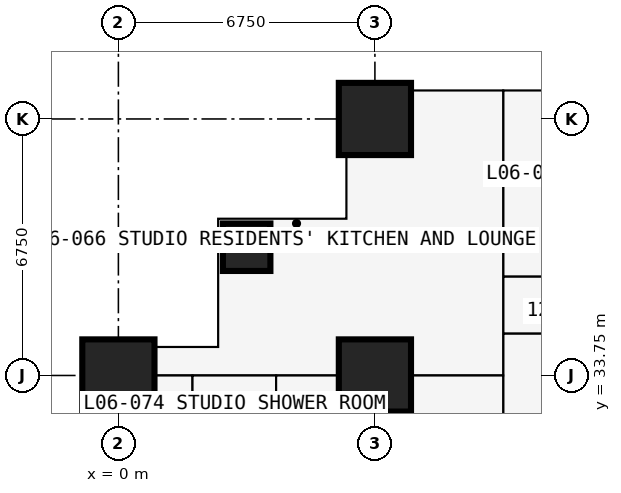
"""IFC4 building model, lengths in metres.
Left out: names, types, materials, properties, quantities, classifications, styles, units other than length and angle.
Written with IfcOpenShell. Run it as: python <this file> out.ifc"""

import sys

from ifc_helpers import new_model, si_unit, direction, frame, frame_2d, origin, origin_2d, place, context, subcontext, project, spatial, rectangle, extrude, element, fill, save


model = new_model("IFC4")
c1 = context("Model", 3, precision=1e-05, world=origin(), true_north=direction((0.0, 1.0)))
c2 = subcontext(c1, "Body", "Model", "MODEL_VIEW")
j1 = project(units=[si_unit("LENGTHUNIT", "METRE"), si_unit("PLANEANGLEUNIT", "RADIAN")], contexts=[c1])
p1 = place(None, origin())
s1 = spatial("IfcSite", under=j1, at=p1, CompositionType="ELEMENT")
p2 = place(p1, origin())
s2 = spatial("IfcBuilding", under=s1, at=p2, CompositionType="ELEMENT")
p3 = place(p2, frame((0.0, 0.0, 25.2)))
s3 = spatial("IfcBuildingStorey", under=s2, at=p3, CompositionType="ELEMENT", Elevation=25.2)
p4 = place(p3, frame((0.0, 33.75, 0.0), z_axis=(0.0, 0.0, 1.0), x_axis=(1.0, 0.0, 0.0)))
e1 = element("IfcColumn", 1, at=p4, inside=s3, PredefinedType="COLUMN", context=c2, shape_type="SweptSolid", body=[
    extrude(rectangle(XDim=1.9, YDim=1.9, at=origin_2d()), origin(), (0.0, 0.0, 1.0), 3.6),
])
p5 = place(p3, frame((3.375, 37.125, 0.0), z_axis=(0.0, 0.0, 1.0), x_axis=(1.0, 0.0, 0.0)))
e2 = element("IfcColumn", 2, at=p5, inside=s3, PredefinedType="COLUMN", context=c2, shape_type="SweptSolid", body=[
    extrude(rectangle(XDim=1.25, YDim=1.25, at=origin_2d()), origin(), (0.0, 0.0, 1.0), 3.6),
])
for number, where, z_axis, x_axis in (
    (3, (6.75, 33.75, 0.0), (0.0, 0.0, 1.0), (1.0, 0.0, 0.0)),
    (4, (6.75, 40.5, 0.0), (0.0, 0.0, 1.0), (1.0, 0.0, 0.0)),
):
    element("IfcColumn", number, at=place(p3, frame(where, z_axis=z_axis, x_axis=x_axis)), inside=s3, PredefinedType="COLUMN", context=c2, shape_type="SweptSolid", body=[
        extrude(rectangle(XDim=1.9, YDim=1.9, at=origin_2d()), origin(), (0.0, 0.0, 1.0), 3.6),
    ])
p6 = place(p3, frame((6.0, 41.25, 0.0), z_axis=(0.0, 0.0, 1.0), x_axis=(0.0, -1.0, 0.0)))
e5 = element("IfcWall", 5, at=p6, inside=s3, PredefinedType="SOLIDWALL", context=c2, shape_type="SweptSolid", body=[
    extrude(rectangle(XDim=3.375, YDim=0.3, at=frame_2d((1.688, 0.0))), origin(), (0.0, 0.0, 1.0), 3.375),
])
p7 = place(p6, frame((1.857, 0.0, 0.9)))
e6 = element("IfcOpeningElement", 6, at=p7, cuts=e5, PredefinedType="OPENING", context=c2, shape_type="SweptSolid", body=[
    extrude(rectangle(XDim=1.2, YDim=1.8, at=frame_2d((0.6, 0.9))), frame((0.0, 0.16, 0.0), z_axis=(0.0, -1.0, 0.0), x_axis=(1.0, 0.0, 0.0)), (0.0, 0.0, 1.0), 0.32),
])
p8 = place(p3, frame((6.0, 37.875, 0.0), z_axis=(0.0, 0.0, 1.0), x_axis=(-1.0, 0.0, 0.0)))
e7 = element("IfcWall", 7, at=p8, inside=s3, PredefinedType="SOLIDWALL", context=c2, shape_type="SweptSolid", body=[
    extrude(rectangle(XDim=3.375, YDim=0.3, at=frame_2d((1.688, 0.0))), origin(), (0.0, 0.0, 1.0), 3.375),
])
p9 = place(p8, frame((0.788, 0.0, 0.6)))
e8 = element("IfcOpeningElement", 8, at=p9, cuts=e7, PredefinedType="OPENING", context=c2, shape_type="SweptSolid", body=[
    extrude(rectangle(XDim=1.8, YDim=2.1, at=frame_2d((0.9, 1.05))), frame((0.0, 0.16, 0.0), z_axis=(0.0, -1.0, 0.0), x_axis=(1.0, 0.0, 0.0)), (0.0, 0.0, 1.0), 0.32),
])
p10 = place(p3, frame((2.625, 37.875, 0.0), z_axis=(0.0, 0.0, 1.0), x_axis=(0.0, -1.0, 0.0)))
e9 = element("IfcWall", 9, at=p10, inside=s3, PredefinedType="SOLIDWALL", context=c2, shape_type="SweptSolid", body=[
    extrude(rectangle(XDim=3.375, YDim=0.3, at=frame_2d((1.688, 0.0))), origin(), (0.0, 0.0, 1.0), 3.375),
])
p11 = place(p10, frame((0.788, 0.0, 0.6)))
e10 = element("IfcOpeningElement", 10, at=p11, cuts=e9, PredefinedType="OPENING", context=c2, shape_type="SweptSolid", body=[
    extrude(rectangle(XDim=1.8, YDim=2.1, at=frame_2d((0.9, 1.05))), frame((0.0, 0.16, 0.0), z_axis=(0.0, -1.0, 0.0), x_axis=(1.0, 0.0, 0.0)), (0.0, 0.0, 1.0), 0.32),
])
p12 = place(p3, frame((2.625, 34.5, 0.0), z_axis=(0.0, 0.0, 1.0), x_axis=(-1.0, 0.0, 0.0)))
e11 = element("IfcWall", 11, at=p12, inside=s3, PredefinedType="SOLIDWALL", context=c2, shape_type="SweptSolid", body=[
    extrude(rectangle(XDim=3.375, YDim=0.3, at=frame_2d((1.688, 0.0))), origin(), (0.0, 0.0, 1.0), 3.375),
])
p13 = place(p12, frame((0.317, 0.0, 0.9)))
e12 = element("IfcOpeningElement", 12, at=p13, cuts=e11, PredefinedType="OPENING", context=c2, shape_type="SweptSolid", body=[
    extrude(rectangle(XDim=1.2, YDim=1.8, at=frame_2d((0.6, 0.9))), frame((0.0, 0.16, 0.0), z_axis=(0.0, -1.0, 0.0), x_axis=(1.0, 0.0, 0.0)), (0.0, 0.0, 1.0), 0.32),
])
p14 = place(p3, frame((-0.734, 33.75, 0.0), z_axis=(0.0, 0.0, 1.0), x_axis=(1.0, 0.0, 0.0)))
e13 = element("IfcWall", 13, at=p14, inside=s3, PredefinedType="PARTITIONING", context=c2, shape_type="SweptSolid", body=[
    extrude(rectangle(XDim=10.859, YDim=0.15, at=frame_2d((5.429, 0.0))), origin(), (0.0, 0.0, 1.0), 2.877),
])
p15 = place(p3, frame((1.95, 31.75, 0.0), z_axis=(0.0, 0.0, 1.0), x_axis=(0.0, 1.0, 0.0)))
e14 = element("IfcWall", 14, at=p15, inside=s3, PredefinedType="PARTITIONING", context=c2, shape_type="SweptSolid", body=[
    extrude(rectangle(XDim=2.0, YDim=0.1, at=frame_2d((1.0, 0.0))), origin(), (0.0, 0.0, 1.0), 3.375),
])
p16 = place(p3, frame((4.15, 10.125, 0.0), z_axis=(0.0, 0.0, 1.0), x_axis=(0.0, 1.0, 0.0)))
e15 = element("IfcWall", 15, at=p16, inside=s3, PredefinedType="PARTITIONING", context=c2, shape_type="SweptSolid", body=[
    extrude(rectangle(XDim=23.625, YDim=0.15, at=frame_2d((11.812, 0.0))), origin(), (0.0, 0.0, 1.0), 3.375),
])
p17 = place(p16, frame((4.2, 0.0, 0.0)))
e16 = element("IfcOpeningElement", 16, at=p17, cuts=e15, PredefinedType="OPENING", context=c2, shape_type="SweptSolid", body=[
    extrude(rectangle(XDim=0.95, YDim=2.2, at=frame_2d((0.475, 1.1))), frame((0.0, 0.085, 0.0), z_axis=(0.0, -1.0, 0.0), x_axis=(1.0, 0.0, 0.0)), (0.0, 0.0, 1.0), 0.17),
])
p18 = place(p16, frame((10.95, 0.0, 0.0)))
e17 = element("IfcOpeningElement", 17, at=p18, cuts=e15, PredefinedType="OPENING", context=c2, shape_type="SweptSolid", body=[
    extrude(rectangle(XDim=0.95, YDim=2.2, at=frame_2d((0.475, 1.1))), frame((0.0, 0.085, 0.0), z_axis=(0.0, -1.0, 0.0), x_axis=(1.0, 0.0, 0.0)), (0.0, 0.0, 1.0), 0.17),
])
p19 = place(p16, frame((17.7, 0.0, 0.0)))
e18 = element("IfcOpeningElement", 18, at=p19, cuts=e15, PredefinedType="OPENING", context=c2, shape_type="SweptSolid", body=[
    extrude(rectangle(XDim=0.95, YDim=2.2, at=frame_2d((0.475, 1.1))), frame((0.0, 0.085, 0.0), z_axis=(0.0, -1.0, 0.0), x_axis=(1.0, 0.0, 0.0)), (0.0, 0.0, 1.0), 0.17),
])
p20 = place(p16, frame((20.5, 0.0, 0.0)))
e19 = element("IfcOpeningElement", 19, at=p20, cuts=e15, PredefinedType="OPENING", context=c2, shape_type="SweptSolid", body=[
    extrude(rectangle(XDim=0.95, YDim=2.2, at=frame_2d((0.475, 1.1))), frame((0.0, 0.085, 0.0), z_axis=(0.0, -1.0, 0.0), x_axis=(1.0, 0.0, 0.0)), (0.0, 0.0, 1.0), 0.17),
])
p21 = place(p3, frame((10.125, 30.375, 0.0), z_axis=(0.0, 0.0, 1.0), x_axis=(0.0, 1.0, 0.0)))
e20 = element("IfcWall", 20, at=p21, inside=s3, PredefinedType="PARTITIONING", context=c2, shape_type="SweptSolid", body=[
    extrude(rectangle(XDim=10.859, YDim=0.15, at=frame_2d((5.429, 0.0))), origin(), (0.0, 0.0, 1.0), 3.375),
])
p22 = place(p21, frame((4.725, 0.0, 0.0)))
e21 = element("IfcOpeningElement", 21, at=p22, cuts=e20, PredefinedType="OPENING", context=c2, shape_type="SweptSolid", body=[
    extrude(rectangle(XDim=1.0, YDim=2.2, at=frame_2d((0.5, 1.1))), frame((0.0, 0.085, 0.0), z_axis=(0.0, -1.0, 0.0), x_axis=(1.0, 0.0, 0.0)), (0.0, 0.0, 1.0), 0.17),
])
p23 = place(p3, frame((10.125, 34.85, 0.0), z_axis=(0.0, 0.0, 1.0), x_axis=(1.0, 0.0, 0.0)))
e22 = element("IfcWall", 22, at=p23, inside=s3, PredefinedType="PARTITIONING", context=c2, shape_type="SweptSolid", body=[
    extrude(rectangle(XDim=10.762, YDim=0.15, at=frame_2d((5.381, 0.0))), origin(), (0.0, 0.0, 1.0), 3.375),
])
p24 = place(p23, frame((4.9, 0.0, 0.0)))
e23 = element("IfcOpeningElement", 23, at=p24, cuts=e22, PredefinedType="OPENING", context=c2, shape_type="SweptSolid", body=[
    extrude(rectangle(XDim=0.95, YDim=2.2, at=frame_2d((0.475, 1.1))), frame((0.0, 0.085, 0.0), z_axis=(0.0, -1.0, 0.0), x_axis=(1.0, 0.0, 0.0)), (0.0, 0.0, 1.0), 0.17),
])
p25 = place(p3, frame((10.125, 36.35, 0.0), z_axis=(0.0, 0.0, 1.0), x_axis=(1.0, 0.0, 0.0)))
e24 = element("IfcWall", 24, at=p25, inside=s3, PredefinedType="PARTITIONING", context=c2, shape_type="SweptSolid", body=[
    extrude(rectangle(XDim=23.625, YDim=0.1, at=frame_2d((11.812, 0.0))), origin(), (0.0, 0.0, 1.0), 3.375),
])
p26 = place(p25, frame((21.45, 0.0, 0.0)))
e25 = element("IfcOpeningElement", 25, at=p26, cuts=e24, PredefinedType="OPENING", context=c2, shape_type="SweptSolid", body=[
    extrude(rectangle(XDim=1.0, YDim=2.2, at=frame_2d((0.5, 1.1))), frame((0.0, 0.06, 0.0), z_axis=(0.0, -1.0, 0.0), x_axis=(1.0, 0.0, 0.0)), (0.0, 0.0, 1.0), 0.12),
])
p27 = place(p25, frame((17.125, 0.0, 0.0)))
e26 = element("IfcOpeningElement", 26, at=p27, cuts=e24, PredefinedType="OPENING", context=c2, shape_type="SweptSolid", body=[
    extrude(rectangle(XDim=0.95, YDim=2.2, at=frame_2d((0.475, 1.1))), frame((0.0, 0.06, 0.0), z_axis=(0.0, -1.0, 0.0), x_axis=(1.0, 0.0, 0.0)), (0.0, 0.0, 1.0), 0.12),
])
p28 = place(p25, frame((13.7, 0.0, 0.0)))
e27 = element("IfcOpeningElement", 27, at=p28, cuts=e24, PredefinedType="OPENING", context=c2, shape_type="SweptSolid", body=[
    extrude(rectangle(XDim=0.95, YDim=2.2, at=frame_2d((0.475, 1.1))), frame((0.0, 0.06, 0.0), z_axis=(0.0, -1.0, 0.0), x_axis=(1.0, 0.0, 0.0)), (0.0, 0.0, 1.0), 0.12),
])
p29 = place(p25, frame((0.2, 0.0, 0.0)))
e28 = element("IfcOpeningElement", 28, at=p29, cuts=e24, PredefinedType="OPENING", context=c2, shape_type="SweptSolid", body=[
    extrude(rectangle(XDim=0.95, YDim=2.2, at=frame_2d((0.475, 1.1))), frame((0.0, 0.06, 0.0), z_axis=(0.0, -1.0, 0.0), x_axis=(1.0, 0.0, 0.0)), (0.0, 0.0, 1.0), 0.12),
])
p30 = place(p25, frame((3.625, 0.0, 0.0)))
e29 = element("IfcOpeningElement", 29, at=p30, cuts=e24, PredefinedType="OPENING", context=c2, shape_type="SweptSolid", body=[
    extrude(rectangle(XDim=0.95, YDim=2.2, at=frame_2d((0.475, 1.1))), frame((0.0, 0.06, 0.0), z_axis=(0.0, -1.0, 0.0), x_axis=(1.0, 0.0, 0.0)), (0.0, 0.0, 1.0), 0.12),
])
p31 = place(p25, frame((7.0, 0.0, 0.0)))
e30 = element("IfcOpeningElement", 30, at=p31, cuts=e24, PredefinedType="OPENING", context=c2, shape_type="SweptSolid", body=[
    extrude(rectangle(XDim=0.95, YDim=2.2, at=frame_2d((0.475, 1.1))), frame((0.0, 0.06, 0.0), z_axis=(0.0, -1.0, 0.0), x_axis=(1.0, 0.0, 0.0)), (0.0, 0.0, 1.0), 0.12),
])
p32 = place(p25, frame((10.375, 0.0, 0.0)))
e31 = element("IfcOpeningElement", 31, at=p32, cuts=e24, PredefinedType="OPENING", context=c2, shape_type="SweptSolid", body=[
    extrude(rectangle(XDim=0.95, YDim=2.2, at=frame_2d((0.475, 1.1))), frame((0.0, 0.06, 0.0), z_axis=(0.0, -1.0, 0.0), x_axis=(1.0, 0.0, 0.0)), (0.0, 0.0, 1.0), 0.12),
])
p33 = place(p7, origin())
e32 = element("IfcWindow", 32, at=p33, inside=s3, PartitioningType="SINGLE_PANEL", PredefinedType="WINDOW", context=c2, shape_type="SweptSolid", body=[
    extrude(rectangle(XDim=1.2, YDim=1.8, at=frame_2d((0.6, 0.9))), frame((0.0, 0.03, 0.0), z_axis=(0.0, -1.0, 0.0), x_axis=(1.0, 0.0, 0.0)), (0.0, 0.0, 1.0), 0.06),
])
fill(e6, e32)
p34 = place(p9, origin())
e33 = element("IfcWindow", 33, at=p34, inside=s3, PartitioningType="SINGLE_PANEL", PredefinedType="WINDOW", context=c2, shape_type="SweptSolid", body=[
    extrude(rectangle(XDim=1.8, YDim=2.1, at=frame_2d((0.9, 1.05))), frame((0.0, 0.03, 0.0), z_axis=(0.0, -1.0, 0.0), x_axis=(1.0, 0.0, 0.0)), (0.0, 0.0, 1.0), 0.06),
])
fill(e8, e33)
p35 = place(p11, origin())
e34 = element("IfcWindow", 34, at=p35, inside=s3, PartitioningType="SINGLE_PANEL", PredefinedType="WINDOW", context=c2, shape_type="SweptSolid", body=[
    extrude(rectangle(XDim=1.8, YDim=2.1, at=frame_2d((0.9, 1.05))), frame((0.0, 0.03, 0.0), z_axis=(0.0, -1.0, 0.0), x_axis=(1.0, 0.0, 0.0)), (0.0, 0.0, 1.0), 0.06),
])
fill(e10, e34)
p36 = place(p13, origin())
e35 = element("IfcWindow", 35, at=p36, inside=s3, PartitioningType="SINGLE_PANEL", PredefinedType="WINDOW", context=c2, shape_type="SweptSolid", body=[
    extrude(rectangle(XDim=1.2, YDim=1.8, at=frame_2d((0.6, 0.9))), frame((0.0, 0.03, 0.0), z_axis=(0.0, -1.0, 0.0), x_axis=(1.0, 0.0, 0.0)), (0.0, 0.0, 1.0), 0.06),
])
fill(e12, e35)
p37 = place(p29, origin())
e36 = element("IfcDoor", 36, at=p37, inside=s3, OperationType="SINGLE_SWING_LEFT", PredefinedType="DOOR", context=c2, shape_type="SweptSolid", body=[
    extrude(rectangle(XDim=0.95, YDim=2.2, at=frame_2d((0.475, 1.1))), frame((0.0, 0.025, 0.0), z_axis=(0.0, -1.0, 0.0), x_axis=(1.0, 0.0, 0.0)), (0.0, 0.0, 1.0), 0.05),
])
fill(e28, e36)
p38 = place(p22, origin())
e37 = element("IfcDoor", 37, at=p38, inside=s3, OperationType="SINGLE_SWING_LEFT", PredefinedType="DOOR", context=c2, shape_type="SweptSolid", body=[
    extrude(rectangle(XDim=1.0, YDim=2.2, at=frame_2d((0.5, 1.1))), frame((0.0, 0.025, 0.0), z_axis=(0.0, -1.0, 0.0), x_axis=(1.0, 0.0, 0.0)), (0.0, 0.0, 1.0), 0.05),
])
fill(e21, e37)
save(model, sys.argv[1])
